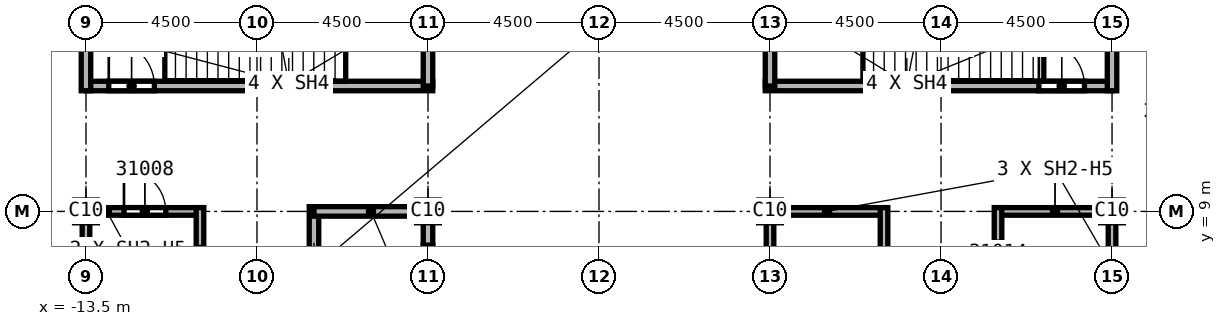
"""IFC4 building model, lengths in metres.
Left out: names, types, materials, properties, quantities, classifications, styles, units other than length and angle.
Written with IfcOpenShell. Run it as: python <this file> out.ifc"""

import sys

from ifc_helpers import new_model, si_unit, direction, frame, frame_2d, origin, origin_2d, place, context, subcontext, project, spatial, rectangle, extrude, element, fill, save


model = new_model("IFC4")
c1 = context("Model", 3, precision=1e-05, world=origin(), true_north=direction((0.0, 1.0)))
c2 = subcontext(c1, "Body", "Model", "MODEL_VIEW")
j1 = project(units=[si_unit("LENGTHUNIT", "METRE"), si_unit("PLANEANGLEUNIT", "RADIAN")], contexts=[c1])
p1 = place(None, origin())
s1 = spatial("IfcSite", under=j1, at=p1, CompositionType="ELEMENT")
p2 = place(p1, origin())
s2 = spatial("IfcBuilding", under=s1, at=p2, CompositionType="ELEMENT")
p3 = place(p2, frame((0.0, 0.0, 350.0)))
s3 = spatial("IfcBuildingStorey", under=s2, at=p3, CompositionType="ELEMENT", Elevation=350.0)
for number, where, z_axis, x_axis in (
    (1, (4.5, 9.0, 0.0), (0.0, 0.0, 1.0), (1.0, 0.0, 0.0)),
    (2, (13.5, 9.0, 0.0), (0.0, 0.0, 1.0), (1.0, 0.0, 0.0)),
    (3, (-4.5, 9.0, 0.0), (0.0, 0.0, 1.0), (1.0, 0.0, 0.0)),
    (4, (-13.5, 9.0, 0.0), (0.0, 0.0, 1.0), (1.0, 0.0, 0.0)),
):
    element("IfcColumn", number, at=place(p3, frame(where, z_axis=z_axis, x_axis=x_axis)), inside=s3, PredefinedType="COLUMN", context=c2, shape_type="SweptSolid", body=[
        extrude(rectangle(XDim=0.6, YDim=0.6, at=origin_2d()), origin(), (0.0, 0.0, 1.0), 5.6),
    ])
p4 = place(p3, frame((-13.5, 7.0, 0.0), z_axis=(0.0, 0.0, 1.0), x_axis=(0.0, 1.0, 0.0)))
e5 = element("IfcWall", 5, at=p4, inside=s3, PredefinedType="SOLIDWALL", context=c2, shape_type="SweptSolid", body=[
    extrude(rectangle(XDim=2.1, YDim=0.2, at=frame_2d((1.05, 0.0))), origin(), (0.0, 0.0, 1.0), 4.838),
])
p5 = place(p3, frame((-13.5, 9.0, 0.0), z_axis=(0.0, 0.0, 1.0), x_axis=(1.0, 0.0, 0.0)))
e6 = element("IfcWall", 6, at=p5, inside=s3, PredefinedType="SOLIDWALL", context=c2, shape_type="SweptSolid", body=[
    extrude(rectangle(XDim=3.0, YDim=0.2, at=frame_2d((1.5, 0.0))), origin(), (0.0, 0.0, 1.0), 4.838),
])
p6 = place(p5, frame((1.0, 0.0, 0.0)))
e7 = element("IfcOpeningElement", 7, at=p6, cuts=e6, PredefinedType="OPENING", context=c2, shape_type="SweptSolid", body=[
    extrude(rectangle(XDim=1.1, YDim=2.1, at=frame_2d((0.55, 1.05))), frame((0.0, 0.1, 0.0), z_axis=(0.0, -1.0, 0.0), x_axis=(1.0, 0.0, 0.0)), (0.0, 0.0, 1.0), 0.2),
])
p7 = place(p3, frame((-10.5, 6.925, 0.0), z_axis=(0.0, 0.0, 1.0), x_axis=(0.0, 1.0, 0.0)))
e8 = element("IfcWall", 8, at=p7, inside=s3, PredefinedType="SOLIDWALL", context=c2, shape_type="SweptSolid", body=[
    extrude(rectangle(XDim=2.175, YDim=0.2, at=frame_2d((1.087, 0.0))), origin(), (0.0, 0.0, 1.0), 5.6),
])
p8 = place(p3, frame((4.5, -6.0, 0.0), z_axis=(0.0, 0.0, 1.0), x_axis=(0.0, 1.0, 0.0)))
e9 = element("IfcWall", 9, at=p8, inside=s3, PredefinedType="SOLIDWALL", context=c2, shape_type="SweptSolid", body=[
    extrude(rectangle(XDim=15.1, YDim=0.2, at=frame_2d((7.55, 0.0))), origin(), (0.0, 0.0, 1.0), 4.838),
])
p9 = place(p8, frame((2.2, 0.0, 0.0)))
e10 = element("IfcOpeningElement", 10, at=p9, cuts=e9, PredefinedType="OPENING", context=c2, shape_type="SweptSolid", body=[
    extrude(rectangle(XDim=1.1, YDim=2.1, at=frame_2d((0.55, 1.05))), frame((0.0, 0.1, 0.0), z_axis=(0.0, -1.0, 0.0), x_axis=(1.0, 0.0, 0.0)), (0.0, 0.0, 1.0), 0.2),
])
p10 = place(p8, frame((9.25, 0.0, 0.0)))
e11 = element("IfcOpeningElement", 11, at=p10, cuts=e9, PredefinedType="OPENING", context=c2, shape_type="SweptSolid", body=[
    extrude(rectangle(XDim=1.1, YDim=2.1, at=frame_2d((0.55, 1.05))), frame((0.0, 0.1, 0.0), z_axis=(0.0, -1.0, 0.0), x_axis=(1.0, 0.0, 0.0)), (0.0, 0.0, 1.0), 0.2),
])
p11 = place(p3, frame((4.5, 9.0, 0.0), z_axis=(0.0, 0.0, 1.0), x_axis=(1.0, 0.0, 0.0)))
e12 = element("IfcWall", 12, at=p11, inside=s3, PredefinedType="SOLIDWALL", context=c2, shape_type="SweptSolid", body=[
    extrude(rectangle(XDim=3.0, YDim=0.2, at=frame_2d((1.5, 0.0))), origin(), (0.0, 0.0, 1.0), 4.838),
])
p12 = place(p3, frame((7.5, 9.1, 0.0), z_axis=(0.0, 0.0, 1.0), x_axis=(0.0, -1.0, 0.0)))
e13 = element("IfcWall", 13, at=p12, inside=s3, PredefinedType="SOLIDWALL", context=c2, shape_type="SweptSolid", body=[
    extrude(rectangle(XDim=6.225, YDim=0.2, at=frame_2d((3.113, 0.0))), origin(), (0.0, 0.0, 1.0), 5.6),
])
p13 = place(p3, frame((10.5, 9.0, 0.0), z_axis=(0.0, 0.0, 1.0), x_axis=(1.0, 0.0, 0.0)))
e14 = element("IfcWall", 14, at=p13, inside=s3, PredefinedType="SOLIDWALL", context=c2, shape_type="SweptSolid", body=[
    extrude(rectangle(XDim=3.0, YDim=0.2, at=frame_2d((1.5, 0.0))), origin(), (0.0, 0.0, 1.0), 4.838),
])
p14 = place(p3, frame((10.5, 9.1, 0.0), z_axis=(0.0, 0.0, 1.0), x_axis=(0.0, -1.0, 0.0)))
e15 = element("IfcWall", 15, at=p14, inside=s3, PredefinedType="SOLIDWALL", context=c2, shape_type="SweptSolid", body=[
    extrude(rectangle(XDim=3.225, YDim=0.2, at=frame_2d((1.613, 0.0))), origin(), (0.0, 0.0, 1.0), 5.6),
])
p15 = place(p14, frame((1.75, 0.0, 0.0)))
e16 = element("IfcOpeningElement", 16, at=p15, cuts=e15, PredefinedType="OPENING", context=c2, shape_type="SweptSolid", body=[
    extrude(rectangle(XDim=1.1, YDim=2.1, at=frame_2d((0.55, 1.05))), frame((0.0, 0.1, 0.0), z_axis=(0.0, -1.0, 0.0), x_axis=(1.0, 0.0, 0.0)), (0.0, 0.0, 1.0), 0.2),
])
p16 = place(p3, frame((13.5, 9.1, 0.0), z_axis=(0.0, 0.0, 1.0), x_axis=(0.0, -1.0, 0.0)))
e17 = element("IfcWall", 17, at=p16, inside=s3, PredefinedType="SOLIDWALL", context=c2, shape_type="SweptSolid", body=[
    extrude(rectangle(XDim=3.1, YDim=0.2, at=frame_2d((1.55, 0.0))), origin(), (0.0, 0.0, 1.0), 4.838),
])
p17 = place(p3, frame((-7.5, 6.0, 0.0), z_axis=(0.0, 0.0, 1.0), x_axis=(0.0, 1.0, 0.0)))
e18 = element("IfcWall", 18, at=p17, inside=s3, PredefinedType="SOLIDWALL", context=c2, shape_type="SweptSolid", body=[
    extrude(rectangle(XDim=3.125, YDim=0.25, at=frame_2d((1.562, 0.0))), origin(), (0.0, 0.0, 1.0), 5.6),
])
p18 = place(p3, frame((-7.5, 9.0, 0.0), z_axis=(0.0, 0.0, 1.0), x_axis=(1.0, 0.0, 0.0)))
e19 = element("IfcWall", 19, at=p18, inside=s3, PredefinedType="SOLIDWALL", context=c2, shape_type="SweptSolid", body=[
    extrude(rectangle(XDim=3.0, YDim=0.25, at=frame_2d((1.5, 0.0))), origin(), (0.0, 0.0, 1.0), 4.838),
])
p19 = place(p3, frame((-4.5, 9.125, 0.0), z_axis=(0.0, 0.0, 1.0), x_axis=(0.0, -1.0, 0.0)))
e20 = element("IfcWall", 20, at=p19, inside=s3, PredefinedType="SOLIDWALL", context=c2, shape_type="SweptSolid", body=[
    extrude(rectangle(XDim=3.125, YDim=0.25, at=frame_2d((1.562, 0.0))), origin(), (0.0, 0.0, 1.0), 4.838),
])
p20 = place(p19, frame((1.012, 0.0, 0.0)))
e21 = element("IfcOpeningElement", 21, at=p20, cuts=e20, PredefinedType="OPENING", context=c2, shape_type="SweptSolid", body=[
    extrude(rectangle(XDim=1.1, YDim=2.1, at=frame_2d((0.55, 1.05))), frame((0.0, 0.125, 0.0), z_axis=(0.0, -1.0, 0.0), x_axis=(1.0, 0.0, 0.0)), (0.0, 0.0, 1.0), 0.25),
])
p21 = place(p3, frame((-13.5, 12.3, 0.0), z_axis=(0.0, 0.0, 1.0), x_axis=(1.0, 0.0, 0.0)))
e22 = element("IfcWall", 22, at=p21, inside=s3, PredefinedType="SOLIDWALL", context=c2, shape_type="SweptSolid", body=[
    extrude(rectangle(XDim=9.125, YDim=0.25, at=frame_2d((4.562, 0.0))), origin(), (0.0, 0.0, 1.0), 5.6),
])
p22 = place(p21, frame((0.6, 0.0, 0.0)))
e23 = element("IfcOpeningElement", 23, at=p22, cuts=e22, PredefinedType="OPENING", context=c2, shape_type="SweptSolid", body=[
    extrude(rectangle(XDim=1.2, YDim=2.1, at=frame_2d((0.6, 1.05))), frame((0.0, 0.125, 0.0), z_axis=(0.0, -1.0, 0.0), x_axis=(1.0, 0.0, 0.0)), (0.0, 0.0, 1.0), 0.25),
])
p23 = place(p3, frame((-13.5, 12.175, 0.0), z_axis=(0.0, 0.0, 1.0), x_axis=(0.0, 1.0, 0.0)))
e24 = element("IfcWall", 24, at=p23, inside=s3, PredefinedType="SOLIDWALL", context=c2, shape_type="SweptSolid", body=[
    extrude(rectangle(XDim=4.75, YDim=0.25, at=frame_2d((2.375, 0.0))), origin(), (0.0, 0.0, 1.0), 5.6),
])
p24 = place(p3, frame((-4.5, 16.925, 0.0), z_axis=(0.0, 0.0, 1.0), x_axis=(0.0, -1.0, 0.0)))
e25 = element("IfcWall", 25, at=p24, inside=s3, PredefinedType="SOLIDWALL", context=c2, shape_type="SweptSolid", body=[
    extrude(rectangle(XDim=4.625, YDim=0.25, at=frame_2d((2.312, 0.0))), origin(), (0.0, 0.0, 1.0), 5.6),
])
p25 = place(p3, frame((4.375, 12.3, 0.0), z_axis=(0.0, 0.0, 1.0), x_axis=(1.0, 0.0, 0.0)))
e26 = element("IfcWall", 26, at=p25, inside=s3, PredefinedType="SOLIDWALL", context=c2, shape_type="SweptSolid", body=[
    extrude(rectangle(XDim=9.125, YDim=0.25, at=frame_2d((4.562, 0.0))), origin(), (0.0, 0.0, 1.0), 5.6),
])
p26 = place(p25, frame((7.2, 0.0, 0.0)))
e27 = element("IfcOpeningElement", 27, at=p26, cuts=e26, PredefinedType="OPENING", context=c2, shape_type="SweptSolid", body=[
    extrude(rectangle(XDim=1.2, YDim=2.1, at=frame_2d((0.6, 1.05))), frame((0.0, 0.125, 0.0), z_axis=(0.0, -1.0, 0.0), x_axis=(1.0, 0.0, 0.0)), (0.0, 0.0, 1.0), 0.25),
])
p27 = place(p3, frame((4.5, 12.3, 0.0), z_axis=(0.0, 0.0, 1.0), x_axis=(0.0, 1.0, 0.0)))
e28 = element("IfcWall", 28, at=p27, inside=s3, PredefinedType="SOLIDWALL", context=c2, shape_type="SweptSolid", body=[
    extrude(rectangle(XDim=4.625, YDim=0.25, at=frame_2d((2.312, 0.0))), origin(), (0.0, 0.0, 1.0), 5.6),
])
p28 = place(p3, frame((13.5, 12.175, 0.0), z_axis=(0.0, 0.0, 1.0), x_axis=(0.0, 1.0, 0.0)))
e29 = element("IfcWall", 29, at=p28, inside=s3, PredefinedType="SOLIDWALL", context=c2, shape_type="SweptSolid", body=[
    extrude(rectangle(XDim=4.75, YDim=0.25, at=frame_2d((2.375, 0.0))), origin(), (0.0, 0.0, 1.0), 5.6),
])
p29 = place(p6, origin())
e30 = element("IfcDoor", 30, at=p29, inside=s3, OperationType="SINGLE_SWING_LEFT", PredefinedType="DOOR", context=c2, shape_type="SweptSolid", body=[
    extrude(rectangle(XDim=1.1, YDim=2.1, at=frame_2d((0.55, 1.05))), frame((0.0, 0.025, 0.0), z_axis=(0.0, -1.0, 0.0), x_axis=(1.0, 0.0, 0.0)), (0.0, 0.0, 1.0), 0.05),
])
fill(e7, e30)
p30 = place(p22, origin())
e31 = element("IfcDoor", 31, at=p30, inside=s3, OperationType="SINGLE_SWING_RIGHT", PredefinedType="DOOR", context=c2, shape_type="SweptSolid", body=[
    extrude(rectangle(XDim=1.2, YDim=2.1, at=frame_2d((0.6, 1.05))), frame((0.0, 0.025, 0.0), z_axis=(0.0, -1.0, 0.0), x_axis=(1.0, 0.0, 0.0)), (0.0, 0.0, 1.0), 0.05),
])
fill(e23, e31)
p31 = place(p26, origin())
e32 = element("IfcDoor", 32, at=p31, inside=s3, OperationType="SINGLE_SWING_RIGHT", PredefinedType="DOOR", context=c2, shape_type="SweptSolid", body=[
    extrude(rectangle(XDim=1.2, YDim=2.1, at=frame_2d((0.6, 1.05))), frame((0.0, 0.025, 0.0), z_axis=(0.0, -1.0, 0.0), x_axis=(1.0, 0.0, 0.0)), (0.0, 0.0, 1.0), 0.05),
])
fill(e27, e32)
p32 = place(p20, origin())
e33 = element("IfcDoor", 33, at=p32, inside=s3, OperationType="SLIDING_TO_LEFT", PredefinedType="DOOR", context=c2, shape_type="SweptSolid", body=[
    extrude(rectangle(XDim=1.1, YDim=2.1, at=frame_2d((0.55, 1.05))), frame((0.0, 0.025, 0.0), z_axis=(0.0, -1.0, 0.0), x_axis=(1.0, 0.0, 0.0)), (0.0, 0.0, 1.0), 0.05),
])
fill(e21, e33)
save(model, sys.argv[1])
